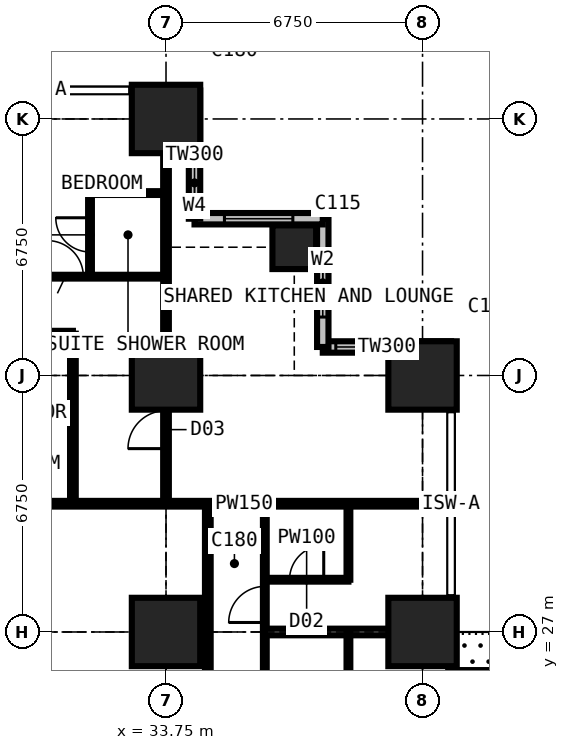
"""IFC4 building model, lengths in metres.
Left out: names, types, materials, properties, quantities, classifications, styles, units other than length and angle.
Written with IfcOpenShell. Run it as: python <this file> out.ifc"""

import sys

from ifc_helpers import new_model, si_unit, direction, frame, frame_2d, origin, origin_2d, place, context, subcontext, project, spatial, rectangle, extrude, element, fill, save


model = new_model("IFC4")
c1 = context("Model", 3, precision=1e-05, world=origin(), true_north=direction((0.0, 1.0)))
c2 = subcontext(c1, "Body", "Model", "MODEL_VIEW")
j1 = project(units=[si_unit("LENGTHUNIT", "METRE"), si_unit("PLANEANGLEUNIT", "RADIAN")], contexts=[c1])
p1 = place(None, origin())
s1 = spatial("IfcSite", under=j1, at=p1, CompositionType="ELEMENT")
p2 = place(p1, origin())
s2 = spatial("IfcBuilding", under=s1, at=p2, CompositionType="ELEMENT")
p3 = place(p2, frame((0.0, 0.0, 57.6)))
s3 = spatial("IfcBuildingStorey", under=s2, at=p3, CompositionType="ELEMENT", Elevation=57.6)
for number, where, z_axis, x_axis in (
    (1, (33.75, 27.0, 0.0), (0.0, 0.0, 1.0), (1.0, 0.0, 0.0)),
    (2, (33.75, 33.75, 0.0), (0.0, 0.0, 1.0), (1.0, 0.0, 0.0)),
    (3, (33.75, 40.5, 0.0), (0.0, 0.0, 1.0), (1.0, 0.0, 0.0)),
):
    element("IfcColumn", number, at=place(p3, frame(where, z_axis=z_axis, x_axis=x_axis)), inside=s3, PredefinedType="COLUMN", context=c2, shape_type="SweptSolid", body=[
        extrude(rectangle(XDim=1.8, YDim=1.8, at=origin_2d()), origin(), (0.0, 0.0, 1.0), 3.6),
    ])
p4 = place(p3, frame((37.125, 37.125, 0.0), z_axis=(0.0, 0.0, 1.0), x_axis=(1.0, 0.0, 0.0)))
e4 = element("IfcColumn", 4, at=p4, inside=s3, PredefinedType="COLUMN", context=c2, shape_type="SweptSolid", body=[
    extrude(rectangle(XDim=1.15, YDim=1.15, at=origin_2d()), origin(), (0.0, 0.0, 1.0), 3.6),
])
for number, where, z_axis, x_axis in (
    (5, (40.5, 27.0, 0.0), (0.0, 0.0, 1.0), (1.0, 0.0, 0.0)),
    (6, (40.5, 33.75, 0.0), (0.0, 0.0, 1.0), (1.0, 0.0, 0.0)),
):
    element("IfcColumn", number, at=place(p3, frame(where, z_axis=z_axis, x_axis=x_axis)), inside=s3, PredefinedType="COLUMN", context=c2, shape_type="SweptSolid", body=[
        extrude(rectangle(XDim=1.8, YDim=1.8, at=origin_2d()), origin(), (0.0, 0.0, 1.0), 3.6),
    ])
p5 = place(p3, frame((41.25, 27.0, 0.0), z_axis=(0.0, 0.0, 1.0), x_axis=(0.0, -1.0, 0.0)))
e7 = element("IfcWall", 7, at=p5, inside=s3, PredefinedType="SOLIDWALL", context=c2, shape_type="SweptSolid", body=[
    extrude(rectangle(XDim=6.75, YDim=0.15, at=frame_2d((3.375, 0.0))), origin(), (0.0, 0.0, 1.0), 3.375),
])
p6 = place(p5, frame((0.962, 0.0, 0.0)))
e8 = element("IfcOpeningElement", 8, at=p6, cuts=e7, PredefinedType="OPENING", context=c2, shape_type="SweptSolid", body=[
    extrude(rectangle(XDim=1.0, YDim=2.2, at=frame_2d((0.5, 1.1))), frame((0.0, 0.085, 0.0), z_axis=(0.0, -1.0, 0.0), x_axis=(1.0, 0.0, 0.0)), (0.0, 0.0, 1.0), 0.17),
])
p7 = place(p5, frame((2.025, 0.0, 0.9)))
e9 = element("IfcOpeningElement", 9, at=p7, cuts=e7, PredefinedType="OPENING", context=c2, shape_type="SweptSolid", body=[
    extrude(rectangle(XDim=1.2, YDim=1.8, at=frame_2d((0.6, 0.9))), frame((0.0, 0.085, 0.0), z_axis=(0.0, -1.0, 0.0), x_axis=(1.0, 0.0, 0.0)), (0.0, 0.0, 1.0), 0.17),
])
p8 = place(p5, frame((4.788, 0.0, 0.0)))
e10 = element("IfcOpeningElement", 10, at=p8, cuts=e7, PredefinedType="OPENING", context=c2, shape_type="SweptSolid", body=[
    extrude(rectangle(XDim=1.0, YDim=2.2, at=frame_2d((0.5, 1.1))), frame((0.0, 0.085, 0.0), z_axis=(0.0, -1.0, 0.0), x_axis=(1.0, 0.0, 0.0)), (0.0, 0.0, 1.0), 0.17),
])
p9 = place(p5, frame((3.525, 0.0, 0.9)))
e11 = element("IfcOpeningElement", 11, at=p9, cuts=e7, PredefinedType="OPENING", context=c2, shape_type="SweptSolid", body=[
    extrude(rectangle(XDim=1.2, YDim=1.8, at=frame_2d((0.6, 0.9))), frame((0.0, 0.085, 0.0), z_axis=(0.0, -1.0, 0.0), x_axis=(1.0, 0.0, 0.0)), (0.0, 0.0, 1.0), 0.17),
])
p10 = place(p3, frame((41.25, 34.5, 0.0), z_axis=(0.0, 0.0, 1.0), x_axis=(-1.0, 0.0, 0.0)))
e12 = element("IfcWall", 12, at=p10, inside=s3, PredefinedType="SOLIDWALL", context=c2, shape_type="SweptSolid", body=[
    extrude(rectangle(XDim=3.375, YDim=0.3, at=frame_2d((1.688, 0.0))), origin(), (0.0, 0.0, 1.0), 3.375),
])
p11 = place(p10, frame((1.833, 0.0, 0.9)))
e13 = element("IfcOpeningElement", 13, at=p11, cuts=e12, PredefinedType="OPENING", context=c2, shape_type="SweptSolid", body=[
    extrude(rectangle(XDim=1.2, YDim=1.8, at=frame_2d((0.6, 0.9))), frame((0.0, 0.16, 0.0), z_axis=(0.0, -1.0, 0.0), x_axis=(1.0, 0.0, 0.0)), (0.0, 0.0, 1.0), 0.32),
])
p12 = place(p3, frame((37.875, 34.5, 0.0), z_axis=(0.0, 0.0, 1.0), x_axis=(0.0, 1.0, 0.0)))
e14 = element("IfcWall", 14, at=p12, inside=s3, PredefinedType="SOLIDWALL", context=c2, shape_type="SweptSolid", body=[
    extrude(rectangle(XDim=3.375, YDim=0.3, at=frame_2d((1.688, 0.0))), origin(), (0.0, 0.0, 1.0), 3.375),
])
p13 = place(p12, frame((0.788, 0.0, 0.6)))
e15 = element("IfcOpeningElement", 15, at=p13, cuts=e14, PredefinedType="OPENING", context=c2, shape_type="SweptSolid", body=[
    extrude(rectangle(XDim=1.8, YDim=2.1, at=frame_2d((0.9, 1.05))), frame((0.0, 0.16, 0.0), z_axis=(0.0, -1.0, 0.0), x_axis=(1.0, 0.0, 0.0)), (0.0, 0.0, 1.0), 0.32),
])
p14 = place(p3, frame((37.875, 37.875, 0.0), z_axis=(0.0, 0.0, 1.0), x_axis=(-1.0, 0.0, 0.0)))
e16 = element("IfcWall", 16, at=p14, inside=s3, PredefinedType="SOLIDWALL", context=c2, shape_type="SweptSolid", body=[
    extrude(rectangle(XDim=3.375, YDim=0.3, at=frame_2d((1.688, 0.0))), origin(), (0.0, 0.0, 1.0), 3.375),
])
p15 = place(p14, frame((0.788, 0.0, 0.6)))
e17 = element("IfcOpeningElement", 17, at=p15, cuts=e16, PredefinedType="OPENING", context=c2, shape_type="SweptSolid", body=[
    extrude(rectangle(XDim=1.8, YDim=2.1, at=frame_2d((0.9, 1.05))), frame((0.0, 0.16, 0.0), z_axis=(0.0, -1.0, 0.0), x_axis=(1.0, 0.0, 0.0)), (0.0, 0.0, 1.0), 0.32),
])
p16 = place(p3, frame((34.5, 37.875, 0.0), z_axis=(0.0, 0.0, 1.0), x_axis=(0.0, 1.0, 0.0)))
e18 = element("IfcWall", 18, at=p16, inside=s3, PredefinedType="SOLIDWALL", context=c2, shape_type="SweptSolid", body=[
    extrude(rectangle(XDim=3.375, YDim=0.3, at=frame_2d((1.688, 0.0))), origin(), (0.0, 0.0, 1.0), 3.375),
])
p17 = place(p16, frame((0.343, 0.0, 0.9)))
e19 = element("IfcOpeningElement", 19, at=p17, cuts=e18, PredefinedType="OPENING", context=c2, shape_type="SweptSolid", body=[
    extrude(rectangle(XDim=1.2, YDim=1.8, at=frame_2d((0.6, 0.9))), frame((0.0, 0.16, 0.0), z_axis=(0.0, -1.0, 0.0), x_axis=(1.0, 0.0, 0.0)), (0.0, 0.0, 1.0), 0.32),
])
p18 = place(p3, frame((10.125, 36.35, 0.0), z_axis=(0.0, 0.0, 1.0), x_axis=(1.0, 0.0, 0.0)))
e20 = element("IfcWall", 20, at=p18, inside=s3, PredefinedType="PARTITIONING", context=c2, shape_type="SweptSolid", body=[
    extrude(rectangle(XDim=23.625, YDim=0.1, at=frame_2d((11.812, 0.0))), origin(), (0.0, 0.0, 1.0), 3.375),
])
p19 = place(p18, frame((20.5, 0.0, 0.0)))
e21 = element("IfcOpeningElement", 21, at=p19, cuts=e20, PredefinedType="OPENING", context=c2, shape_type="SweptSolid", body=[
    extrude(rectangle(XDim=0.95, YDim=2.2, at=frame_2d((0.475, 1.1))), frame((0.0, 0.06, 0.0), z_axis=(0.0, -1.0, 0.0), x_axis=(1.0, 0.0, 0.0)), (0.0, 0.0, 1.0), 0.12),
])
p20 = place(p18, frame((17.125, 0.0, 0.0)))
e22 = element("IfcOpeningElement", 22, at=p20, cuts=e20, PredefinedType="OPENING", context=c2, shape_type="SweptSolid", body=[
    extrude(rectangle(XDim=0.95, YDim=2.2, at=frame_2d((0.475, 1.1))), frame((0.0, 0.06, 0.0), z_axis=(0.0, -1.0, 0.0), x_axis=(1.0, 0.0, 0.0)), (0.0, 0.0, 1.0), 0.12),
])
p21 = place(p18, frame((13.7, 0.0, 0.0)))
e23 = element("IfcOpeningElement", 23, at=p21, cuts=e20, PredefinedType="OPENING", context=c2, shape_type="SweptSolid", body=[
    extrude(rectangle(XDim=0.95, YDim=2.2, at=frame_2d((0.475, 1.1))), frame((0.0, 0.06, 0.0), z_axis=(0.0, -1.0, 0.0), x_axis=(1.0, 0.0, 0.0)), (0.0, 0.0, 1.0), 0.12),
])
p22 = place(p18, frame((0.2, 0.0, 0.0)))
e24 = element("IfcOpeningElement", 24, at=p22, cuts=e20, PredefinedType="OPENING", context=c2, shape_type="SweptSolid", body=[
    extrude(rectangle(XDim=0.95, YDim=2.2, at=frame_2d((0.475, 1.1))), frame((0.0, 0.06, 0.0), z_axis=(0.0, -1.0, 0.0), x_axis=(1.0, 0.0, 0.0)), (0.0, 0.0, 1.0), 0.12),
])
p23 = place(p18, frame((3.625, 0.0, 0.0)))
e25 = element("IfcOpeningElement", 25, at=p23, cuts=e20, PredefinedType="OPENING", context=c2, shape_type="SweptSolid", body=[
    extrude(rectangle(XDim=0.95, YDim=2.2, at=frame_2d((0.475, 1.1))), frame((0.0, 0.06, 0.0), z_axis=(0.0, -1.0, 0.0), x_axis=(1.0, 0.0, 0.0)), (0.0, 0.0, 1.0), 0.12),
])
p24 = place(p18, frame((7.0, 0.0, 0.0)))
e26 = element("IfcOpeningElement", 26, at=p24, cuts=e20, PredefinedType="OPENING", context=c2, shape_type="SweptSolid", body=[
    extrude(rectangle(XDim=0.95, YDim=2.2, at=frame_2d((0.475, 1.1))), frame((0.0, 0.06, 0.0), z_axis=(0.0, -1.0, 0.0), x_axis=(1.0, 0.0, 0.0)), (0.0, 0.0, 1.0), 0.12),
])
p25 = place(p18, frame((10.375, 0.0, 0.0)))
e27 = element("IfcOpeningElement", 27, at=p25, cuts=e20, PredefinedType="OPENING", context=c2, shape_type="SweptSolid", body=[
    extrude(rectangle(XDim=0.95, YDim=2.2, at=frame_2d((0.475, 1.1))), frame((0.0, 0.06, 0.0), z_axis=(0.0, -1.0, 0.0), x_axis=(1.0, 0.0, 0.0)), (0.0, 0.0, 1.0), 0.12),
])
p26 = place(p3, frame((25.725, 34.85, 0.0), z_axis=(0.0, 0.0, 1.0), x_axis=(1.0, 0.0, 0.0)))
e28 = element("IfcWall", 28, at=p26, inside=s3, PredefinedType="PARTITIONING", context=c2, shape_type="SweptSolid", body=[
    extrude(rectangle(XDim=5.575, YDim=0.15, at=frame_2d((2.788, 0.0))), origin(), (0.0, 0.0, 1.0), 3.375),
])
p27 = place(p3, frame((30.375, 30.375, 0.0), z_axis=(0.0, 0.0, 1.0), x_axis=(1.0, 0.0, 0.0)))
e29 = element("IfcWall", 29, at=p27, inside=s3, PredefinedType="PARTITIONING", context=c2, shape_type="SweptSolid", body=[
    extrude(rectangle(XDim=10.859, YDim=0.15, at=frame_2d((5.429, 0.0))), origin(), (0.0, 0.0, 1.0), 3.375),
])
p28 = place(p3, frame((31.3, 30.375, 0.0), z_axis=(0.0, 0.0, 1.0), x_axis=(0.0, 1.0, 0.0)))
e30 = element("IfcWall", 30, at=p28, inside=s3, PredefinedType="PARTITIONING", context=c2, shape_type="SweptSolid", body=[
    extrude(rectangle(XDim=4.475, YDim=0.15, at=frame_2d((2.238, 0.0))), origin(), (0.0, 0.0, 1.0), 3.375),
])
p29 = place(p3, frame((31.75, 36.35, 0.0), z_axis=(0.0, 0.0, 1.0), x_axis=(0.0, 1.0, 0.0)))
e31 = element("IfcWall", 31, at=p29, inside=s3, PredefinedType="PARTITIONING", context=c2, shape_type="SweptSolid", body=[
    extrude(rectangle(XDim=2.2, YDim=0.1, at=frame_2d((1.1, 0.0))), origin(), (0.0, 0.0, 1.0), 3.375),
])
p30 = place(p29, frame((0.65, 0.0, 0.0)))
e32 = element("IfcOpeningElement", 32, at=p30, cuts=e31, PredefinedType="OPENING", context=c2, shape_type="SweptSolid", body=[
    extrude(rectangle(XDim=0.9, YDim=2.2, at=frame_2d((0.45, 1.1))), frame((0.0, 0.06, 0.0), z_axis=(0.0, -1.0, 0.0), x_axis=(1.0, 0.0, 0.0)), (0.0, 0.0, 1.0), 0.12),
])
p31 = place(p3, frame((31.75, 38.55, 0.0), z_axis=(0.0, 0.0, 1.0), x_axis=(1.0, 0.0, 0.0)))
e33 = element("IfcWall", 33, at=p31, inside=s3, PredefinedType="PARTITIONING", context=c2, shape_type="SweptSolid", body=[
    extrude(rectangle(XDim=2.0, YDim=0.1, at=frame_2d((1.0, 0.0))), origin(), (0.0, 0.0, 1.0), 3.375),
])
p32 = place(p3, frame((33.75, 30.375, 0.0), z_axis=(0.0, 0.0, 1.0), x_axis=(0.0, 1.0, 0.0)))
e34 = element("IfcWall", 34, at=p32, inside=s3, PredefinedType="PARTITIONING", context=c2, shape_type="SweptSolid", body=[
    extrude(rectangle(XDim=10.859, YDim=0.15, at=frame_2d((5.429, 0.0))), origin(), (0.0, 0.0, 1.0), 2.877),
])
p33 = place(p32, frame((1.45, 0.0, 0.0)))
e35 = element("IfcOpeningElement", 35, at=p33, cuts=e34, PredefinedType="OPENING", context=c2, shape_type="SweptSolid", body=[
    extrude(rectangle(XDim=1.0, YDim=2.2, at=frame_2d((0.5, 1.1))), frame((0.0, 0.085, 0.0), z_axis=(0.0, -1.0, 0.0), x_axis=(1.0, 0.0, 0.0)), (0.0, 0.0, 1.0), 0.17),
])
p34 = place(p3, frame((34.85, 12.55, 0.0), z_axis=(0.0, 0.0, 1.0), x_axis=(0.0, 1.0, 0.0)))
e36 = element("IfcWall", 36, at=p34, inside=s3, PredefinedType="PARTITIONING", context=c2, shape_type="SweptSolid", body=[
    extrude(rectangle(XDim=17.825, YDim=0.15, at=frame_2d((8.913, 0.0))), origin(), (0.0, 0.0, 1.0), 3.375),
])
p35 = place(p34, frame((8.6, 0.0, 0.0)))
e37 = element("IfcOpeningElement", 37, at=p35, cuts=e36, PredefinedType="OPENING", context=c2, shape_type="SweptSolid", body=[
    extrude(rectangle(XDim=0.95, YDim=2.2, at=frame_2d((0.475, 1.1))), frame((0.0, 0.085, 0.0), z_axis=(0.0, -1.0, 0.0), x_axis=(1.0, 0.0, 0.0)), (0.0, 0.0, 1.0), 0.17),
])
p36 = place(p3, frame((36.35, 6.75, 0.0), z_axis=(0.0, 0.0, 1.0), x_axis=(0.0, 1.0, 0.0)))
e38 = element("IfcWall", 38, at=p36, inside=s3, PredefinedType="PARTITIONING", context=c2, shape_type="SweptSolid", body=[
    extrude(rectangle(XDim=23.625, YDim=0.1, at=frame_2d((11.812, 0.0))), origin(), (0.0, 0.0, 1.0), 3.375),
])
p37 = place(p36, frame((0.2, 0.0, 0.0)))
e39 = element("IfcOpeningElement", 39, at=p37, cuts=e38, PredefinedType="OPENING", context=c2, shape_type="SweptSolid", body=[
    extrude(rectangle(XDim=0.95, YDim=2.2, at=frame_2d((0.475, 1.1))), frame((0.0, 0.06, 0.0), z_axis=(0.0, -1.0, 0.0), x_axis=(1.0, 0.0, 0.0)), (0.0, 0.0, 1.0), 0.12),
])
p38 = place(p36, frame((3.575, 0.0, 0.0)))
e40 = element("IfcOpeningElement", 40, at=p38, cuts=e38, PredefinedType="OPENING", context=c2, shape_type="SweptSolid", body=[
    extrude(rectangle(XDim=0.95, YDim=2.2, at=frame_2d((0.475, 1.1))), frame((0.0, 0.06, 0.0), z_axis=(0.0, -1.0, 0.0), x_axis=(1.0, 0.0, 0.0)), (0.0, 0.0, 1.0), 0.12),
])
p39 = place(p36, frame((7.0, 0.0, 0.0)))
e41 = element("IfcOpeningElement", 41, at=p39, cuts=e38, PredefinedType="OPENING", context=c2, shape_type="SweptSolid", body=[
    extrude(rectangle(XDim=0.95, YDim=2.2, at=frame_2d((0.475, 1.1))), frame((0.0, 0.06, 0.0), z_axis=(0.0, -1.0, 0.0), x_axis=(1.0, 0.0, 0.0)), (0.0, 0.0, 1.0), 0.12),
])
p40 = place(p36, frame((10.375, 0.0, 0.0)))
e42 = element("IfcOpeningElement", 42, at=p40, cuts=e38, PredefinedType="OPENING", context=c2, shape_type="SweptSolid", body=[
    extrude(rectangle(XDim=0.95, YDim=2.2, at=frame_2d((0.475, 1.1))), frame((0.0, 0.06, 0.0), z_axis=(0.0, -1.0, 0.0), x_axis=(1.0, 0.0, 0.0)), (0.0, 0.0, 1.0), 0.12),
])
p41 = place(p36, frame((13.75, 0.0, 0.0)))
e43 = element("IfcOpeningElement", 43, at=p41, cuts=e38, PredefinedType="OPENING", context=c2, shape_type="SweptSolid", body=[
    extrude(rectangle(XDim=0.95, YDim=2.2, at=frame_2d((0.475, 1.1))), frame((0.0, 0.06, 0.0), z_axis=(0.0, -1.0, 0.0), x_axis=(1.0, 0.0, 0.0)), (0.0, 0.0, 1.0), 0.12),
])
p42 = place(p36, frame((17.125, 0.0, 0.0)))
e44 = element("IfcOpeningElement", 44, at=p42, cuts=e38, PredefinedType="OPENING", context=c2, shape_type="SweptSolid", body=[
    extrude(rectangle(XDim=0.95, YDim=2.2, at=frame_2d((0.475, 1.1))), frame((0.0, 0.06, 0.0), z_axis=(0.0, -1.0, 0.0), x_axis=(1.0, 0.0, 0.0)), (0.0, 0.0, 1.0), 0.12),
])
p43 = place(p36, frame((20.5, 0.0, 0.0)))
e45 = element("IfcOpeningElement", 45, at=p43, cuts=e38, PredefinedType="OPENING", context=c2, shape_type="SweptSolid", body=[
    extrude(rectangle(XDim=0.95, YDim=2.2, at=frame_2d((0.475, 1.1))), frame((0.0, 0.06, 0.0), z_axis=(0.0, -1.0, 0.0), x_axis=(1.0, 0.0, 0.0)), (0.0, 0.0, 1.0), 0.12),
])
p44 = place(p3, frame((36.35, 27.0, 0.0), z_axis=(0.0, 0.0, 1.0), x_axis=(1.0, 0.0, 0.0)))
e46 = element("IfcWall", 46, at=p44, inside=s3, PredefinedType="PARTITIONING", context=c2, shape_type="SweptSolid", body=[
    extrude(rectangle(XDim=4.884, YDim=0.175, at=frame_2d((2.442, 0.0))), origin(), (0.0, 0.0, 1.0), 2.877),
])
p45 = place(p3, frame((36.35, 28.375, 0.0), z_axis=(0.0, 0.0, 1.0), x_axis=(1.0, 0.0, 0.0)))
e47 = element("IfcWall", 47, at=p45, inside=s3, PredefinedType="PARTITIONING", context=c2, shape_type="SweptSolid", body=[
    extrude(rectangle(XDim=2.2, YDim=0.1, at=frame_2d((1.1, 0.0))), origin(), (0.0, 0.0, 1.0), 3.375),
])
p46 = place(p45, frame((0.65, 0.0, 0.0)))
e48 = element("IfcOpeningElement", 48, at=p46, cuts=e47, PredefinedType="OPENING", context=c2, shape_type="SweptSolid", body=[
    extrude(rectangle(XDim=0.9, YDim=2.2, at=frame_2d((0.45, 1.1))), frame((0.0, 0.06, 0.0), z_axis=(0.0, -1.0, 0.0), x_axis=(1.0, 0.0, 0.0)), (0.0, 0.0, 1.0), 0.12),
])
for number, where, z_axis, x_axis in (
    (49, (38.55, 25.0, 0.0), (0.0, 0.0, 1.0), (0.0, 1.0, 0.0)),
    (50, (38.55, 28.375, 0.0), (0.0, 0.0, 1.0), (0.0, 1.0, 0.0)),
):
    element("IfcWall", number, at=place(p3, frame(where, z_axis=z_axis, x_axis=x_axis)), inside=s3, PredefinedType="PARTITIONING", context=c2, shape_type="SweptSolid", body=[
        extrude(rectangle(XDim=2.0, YDim=0.1, at=frame_2d((1.0, 0.0))), origin(), (0.0, 0.0, 1.0), 3.375),
    ])
p47 = place(p6, origin())
e51 = element("IfcDoor", 51, at=p47, inside=s3, OperationType="SINGLE_SWING_LEFT", PredefinedType="DOOR", context=c2, shape_type="SweptSolid", body=[
    extrude(rectangle(XDim=1.0, YDim=2.2, at=frame_2d((0.5, 1.1))), frame((0.0, 0.025, 0.0), z_axis=(0.0, -1.0, 0.0), x_axis=(1.0, 0.0, 0.0)), (0.0, 0.0, 1.0), 0.05),
])
fill(e8, e51)
p48 = place(p11, origin())
e52 = element("IfcWindow", 52, at=p48, inside=s3, PartitioningType="SINGLE_PANEL", PredefinedType="WINDOW", context=c2, shape_type="SweptSolid", body=[
    extrude(rectangle(XDim=1.2, YDim=1.8, at=frame_2d((0.6, 0.9))), frame((0.0, 0.03, 0.0), z_axis=(0.0, -1.0, 0.0), x_axis=(1.0, 0.0, 0.0)), (0.0, 0.0, 1.0), 0.06),
])
fill(e13, e52)
p49 = place(p13, origin())
e53 = element("IfcWindow", 53, at=p49, inside=s3, PartitioningType="SINGLE_PANEL", PredefinedType="WINDOW", context=c2, shape_type="SweptSolid", body=[
    extrude(rectangle(XDim=1.8, YDim=2.1, at=frame_2d((0.9, 1.05))), frame((0.0, 0.03, 0.0), z_axis=(0.0, -1.0, 0.0), x_axis=(1.0, 0.0, 0.0)), (0.0, 0.0, 1.0), 0.06),
])
fill(e15, e53)
p50 = place(p15, origin())
e54 = element("IfcWindow", 54, at=p50, inside=s3, PartitioningType="SINGLE_PANEL", PredefinedType="WINDOW", context=c2, shape_type="SweptSolid", body=[
    extrude(rectangle(XDim=1.8, YDim=2.1, at=frame_2d((0.9, 1.05))), frame((0.0, 0.03, 0.0), z_axis=(0.0, -1.0, 0.0), x_axis=(1.0, 0.0, 0.0)), (0.0, 0.0, 1.0), 0.06),
])
fill(e17, e54)
p51 = place(p17, origin())
e55 = element("IfcWindow", 55, at=p51, inside=s3, PartitioningType="SINGLE_PANEL", PredefinedType="WINDOW", context=c2, shape_type="SweptSolid", body=[
    extrude(rectangle(XDim=1.2, YDim=1.8, at=frame_2d((0.6, 0.9))), frame((0.0, 0.03, 0.0), z_axis=(0.0, -1.0, 0.0), x_axis=(1.0, 0.0, 0.0)), (0.0, 0.0, 1.0), 0.06),
])
fill(e19, e55)
p52 = place(p43, origin())
e56 = element("IfcDoor", 56, at=p52, inside=s3, OperationType="SINGLE_SWING_LEFT", PredefinedType="DOOR", context=c2, shape_type="SweptSolid", body=[
    extrude(rectangle(XDim=0.95, YDim=2.2, at=frame_2d((0.475, 1.1))), frame((0.0, 0.025, 0.0), z_axis=(0.0, -1.0, 0.0), x_axis=(1.0, 0.0, 0.0)), (0.0, 0.0, 1.0), 0.05),
])
fill(e45, e56)
p53 = place(p46, origin())
e57 = element("IfcDoor", 57, at=p53, inside=s3, OperationType="SINGLE_SWING_RIGHT", PredefinedType="DOOR", context=c2, shape_type="SweptSolid", body=[
    extrude(rectangle(XDim=0.9, YDim=2.2, at=frame_2d((0.45, 1.1))), frame((0.0, 0.025, 0.0), z_axis=(0.0, -1.0, 0.0), x_axis=(1.0, 0.0, 0.0)), (0.0, 0.0, 1.0), 0.05),
])
fill(e48, e57)
p54 = place(p33, origin())
e58 = element("IfcDoor", 58, at=p54, inside=s3, OperationType="SINGLE_SWING_LEFT", PredefinedType="DOOR", context=c2, shape_type="SweptSolid", body=[
    extrude(rectangle(XDim=1.0, YDim=2.2, at=frame_2d((0.5, 1.1))), frame((0.0, 0.025, 0.0), z_axis=(0.0, -1.0, 0.0), x_axis=(1.0, 0.0, 0.0)), (0.0, 0.0, 1.0), 0.05),
])
fill(e35, e58)
p55 = place(p19, origin())
e59 = element("IfcDoor", 59, at=p55, inside=s3, OperationType="SINGLE_SWING_LEFT", PredefinedType="DOOR", context=c2, shape_type="SweptSolid", body=[
    extrude(rectangle(XDim=0.95, YDim=2.2, at=frame_2d((0.475, 1.1))), frame((0.0, 0.025, 0.0), z_axis=(0.0, -1.0, 0.0), x_axis=(1.0, 0.0, 0.0)), (0.0, 0.0, 1.0), 0.05),
])
fill(e21, e59)
p56 = place(p30, origin())
e60 = element("IfcDoor", 60, at=p56, inside=s3, OperationType="SINGLE_SWING_RIGHT", PredefinedType="DOOR", context=c2, shape_type="SweptSolid", body=[
    extrude(rectangle(XDim=0.9, YDim=2.2, at=frame_2d((0.45, 1.1))), frame((0.0, 0.025, 0.0), z_axis=(0.0, -1.0, 0.0), x_axis=(1.0, 0.0, 0.0)), (0.0, 0.0, 1.0), 0.05),
])
fill(e32, e60)
save(model, sys.argv[1])
